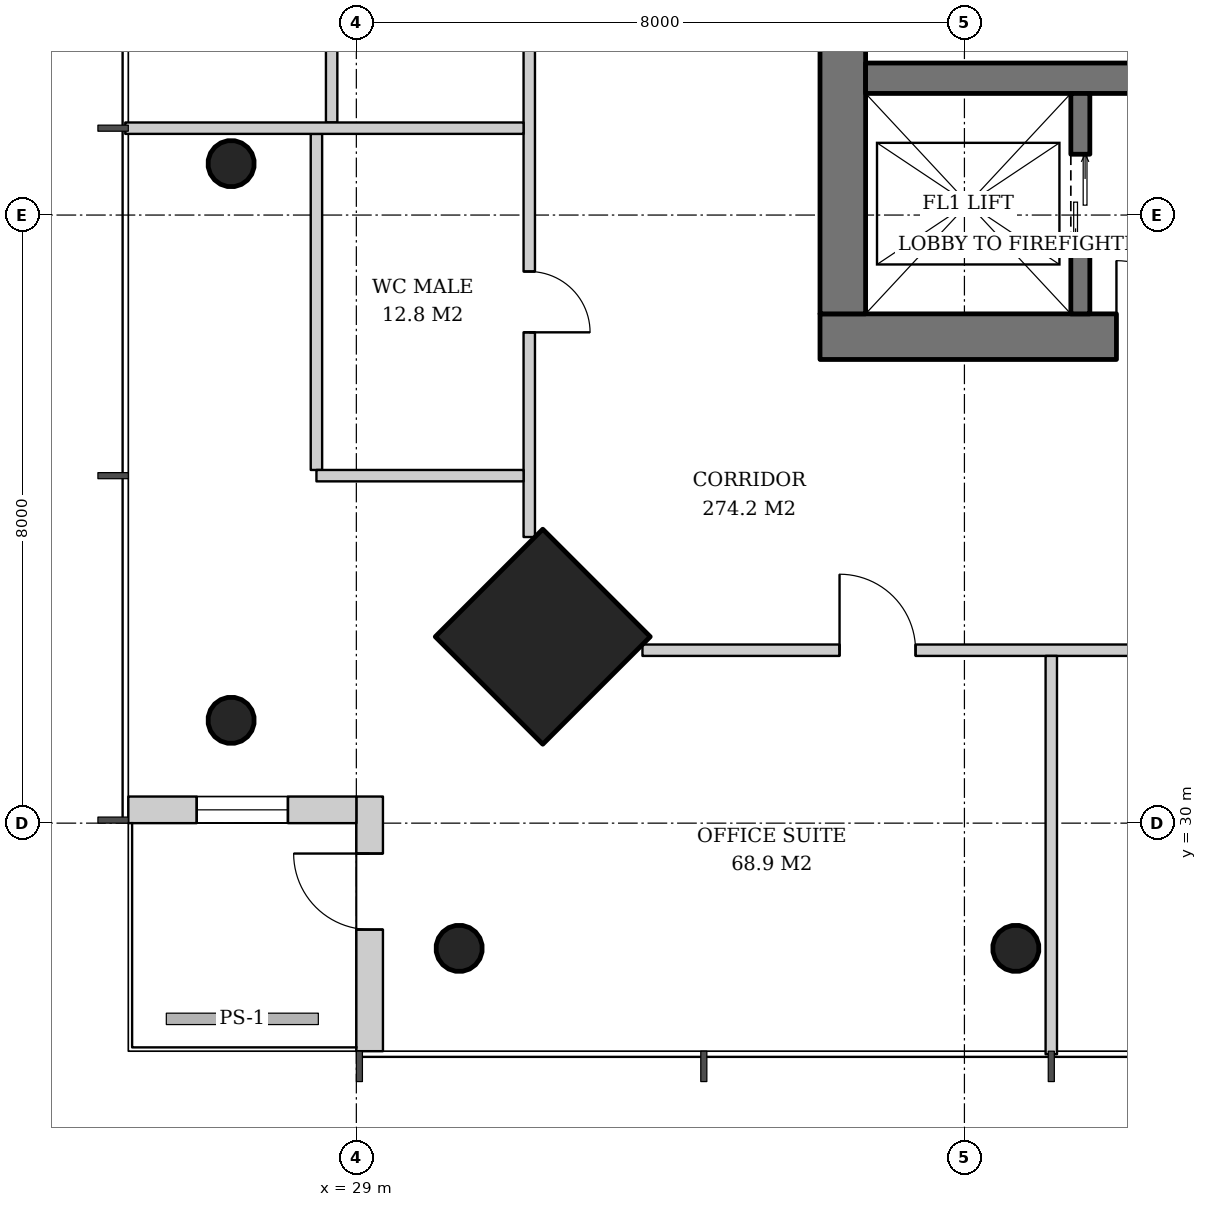
"""IFC4 building model, lengths in metres.
Left out: names, types, materials, properties, quantities, classifications, styles, units other than length and angle.
Written with IfcOpenShell. Run it as: python <this file> out.ifc"""

import sys

from ifc_helpers import new_model, si_unit, direction, frame, frame_2d, origin, origin_2d, place, context, subcontext, project, spatial, rectangle, hollow_circle, extrude, element, fill, save


model = new_model("IFC4")
c1 = context("Model", 3, precision=1e-05, world=origin(), true_north=direction((0.0, 1.0)))
c2 = subcontext(c1, "Body", "Model", "MODEL_VIEW")
j1 = project(units=[si_unit("LENGTHUNIT", "METRE"), si_unit("PLANEANGLEUNIT", "RADIAN")], contexts=[c1])
p1 = place(None, origin())
s1 = spatial("IfcSite", under=j1, at=p1, CompositionType="ELEMENT")
p2 = place(p1, origin())
s2 = spatial("IfcBuilding", under=s1, at=p2, CompositionType="ELEMENT")
p3 = place(p2, frame((0.0, 0.0, 218.6)))
s3 = spatial("IfcBuildingStorey", under=s2, at=p3, CompositionType="ELEMENT", Elevation=218.6)
p4 = place(p3, frame((31.414, 32.414, 0.0), z_axis=(0.031900153262, 0.031900153262, 0.998981861919), x_axis=(-0.707106781187, 0.707106781187, 0.0)))
e1 = element("IfcColumn", 1, at=p4, inside=s3, PredefinedType="COLUMN", context=c2, shape_type="SweptSolid", body=[
    extrude(rectangle(XDim=2.0, YDim=2.0, at=origin_2d()), origin(), (0.0, 0.0, 1.0), 3.804),
])
p5 = place(p3, frame((27.314, 31.314, 0.0), z_axis=(0.031964207655, 0.031964207655, 0.998977766949), x_axis=(-0.707106781187, 0.707106781187, 0.0)))
e2 = element("IfcColumn", 2, at=p5, inside=s3, PredefinedType="COLUMN", context=c2, shape_type="SweptSolid", body=[
    extrude(hollow_circle(Radius=0.305, WallThickness=0.025, at=origin_2d()), origin(), (0.0, 0.0, 1.0), 3.804),
])
p6 = place(p3, frame((27.314, 38.657, 0.0), z_axis=(0.031976494272, 0.015924037308, 0.99936176075), x_axis=(-0.445775033553, 0.895145027055, 0.0)))
e3 = element("IfcColumn", 3, at=p6, inside=s3, PredefinedType="COLUMN", context=c2, shape_type="SweptSolid", body=[
    extrude(hollow_circle(Radius=0.305, WallThickness=0.025, at=origin_2d()), origin(), (0.0, 0.0, 1.0), 3.802),
])
p7 = place(p3, frame((30.314, 28.314, 0.0), z_axis=(0.031964207655, 0.031964207655, 0.998977766949), x_axis=(-0.707106781187, 0.707106781187, 0.0)))
e4 = element("IfcColumn", 4, at=p7, inside=s3, PredefinedType="COLUMN", context=c2, shape_type="SweptSolid", body=[
    extrude(hollow_circle(Radius=0.305, WallThickness=0.025, at=origin_2d()), origin(), (0.0, 0.0, 1.0), 3.804),
])
p8 = place(p3, frame((37.657, 28.314, 0.0), z_axis=(0.015924037308, 0.031976494272, 0.99936176075), x_axis=(-0.895145027055, 0.445775033553, 0.0)))
e5 = element("IfcColumn", 5, at=p8, inside=s3, PredefinedType="COLUMN", context=c2, shape_type="SweptSolid", body=[
    extrude(hollow_circle(Radius=0.305, WallThickness=0.025, at=origin_2d()), origin(), (0.0, 0.0, 1.0), 3.802),
])
p9 = place(p3, frame((35.1, 36.4, 0.0), z_axis=(0.0, 0.0, 1.0), x_axis=(1.0, 0.0, 0.0)))
e6 = element("IfcWall", 6, at=p9, inside=s3, PredefinedType="SHEAR", context=c2, shape_type="SweptSolid", body=[
    extrude(rectangle(XDim=19.8, YDim=0.6, at=frame_2d((9.9, 0.0))), origin(), (0.0, 0.0, 1.0), 3.8),
])
p10 = place(p9, frame((3.9, 0.0, 0.0)))
e7 = element("IfcOpeningElement", 7, at=p10, cuts=e6, PredefinedType="OPENING", context=c2, shape_type="SweptSolid", body=[
    extrude(rectangle(XDim=1.0, YDim=2.1, at=frame_2d((0.5, 1.05))), frame((0.0, 0.31, 0.0), z_axis=(0.0, -1.0, 0.0), x_axis=(1.0, 0.0, 0.0)), (0.0, 0.0, 1.0), 0.62),
])
p11 = place(p9, frame((15.35, 0.0, 0.0)))
e8 = element("IfcOpeningElement", 8, at=p11, cuts=e6, PredefinedType="OPENING", context=c2, shape_type="SweptSolid", body=[
    extrude(rectangle(XDim=1.0, YDim=2.1, at=frame_2d((0.5, 1.05))), frame((0.0, 0.31, 0.0), z_axis=(0.0, -1.0, 0.0), x_axis=(1.0, 0.0, 0.0)), (0.0, 0.0, 1.0), 0.62),
])
p12 = place(p3, frame((35.4, 36.7, 0.0), z_axis=(0.0, 0.0, 1.0), x_axis=(0.0, 1.0, 0.0)))
e9 = element("IfcWall", 9, at=p12, inside=s3, PredefinedType="SHEAR", context=c2, shape_type="SweptSolid", body=[
    extrude(rectangle(XDim=18.6, YDim=0.6, at=frame_2d((9.3, 0.0))), origin(), (0.0, 0.0, 1.0), 3.8),
])
p13 = place(p12, frame((8.4, 0.0, 0.0)))
e10 = element("IfcOpeningElement", 10, at=p13, cuts=e9, PredefinedType="OPENING", context=c2, shape_type="SweptSolid", body=[
    extrude(rectangle(XDim=1.8, YDim=2.4, at=frame_2d((0.9, 1.2))), frame((0.0, 0.31, 0.0), z_axis=(0.0, -1.0, 0.0), x_axis=(1.0, 0.0, 0.0)), (0.0, 0.0, 1.0), 0.62),
])
p14 = place(p3, frame((35.7, 39.8, 0.0), z_axis=(0.0, 0.0, 1.0), x_axis=(1.0, 0.0, 0.0)))
e11 = element("IfcWall", 11, at=p14, inside=s3, PredefinedType="SHEAR", context=c2, shape_type="SweptSolid", body=[
    extrude(rectangle(XDim=18.6, YDim=0.4, at=frame_2d((9.3, 0.0))), origin(), (0.0, 0.0, 1.0), 3.8),
])
p15 = place(p3, frame((29.175, 27.0, 0.0), z_axis=(0.0, 0.0, 1.0), x_axis=(0.0, 1.0, 0.0)))
e12 = element("IfcWall", 12, at=p15, inside=s3, PredefinedType="SOLIDWALL", context=c2, shape_type="SweptSolid", body=[
    extrude(rectangle(XDim=3.35, YDim=0.35, at=frame_2d((1.675, 0.0))), origin(), (0.0, 0.0, 1.0), 3.62),
])
p16 = place(p15, frame((1.6, 0.0, 0.0)))
e13 = element("IfcOpeningElement", 13, at=p16, cuts=e12, PredefinedType="OPENING", context=c2, shape_type="SweptSolid", body=[
    extrude(rectangle(XDim=1.0, YDim=2.4, at=frame_2d((0.5, 1.2))), frame((0.0, 0.185, 0.0), z_axis=(0.0, -1.0, 0.0), x_axis=(1.0, 0.0, 0.0)), (0.0, 0.0, 1.0), 0.37),
])
p17 = place(p3, frame((29.0, 30.175, 0.0), z_axis=(0.0, 0.0, 1.0), x_axis=(-1.0, 0.0, 0.0)))
e14 = element("IfcWall", 14, at=p17, inside=s3, PredefinedType="SOLIDWALL", context=c2, shape_type="SweptSolid", body=[
    extrude(rectangle(XDim=3.0, YDim=0.35, at=frame_2d((1.5, 0.0))), origin(), (0.0, 0.0, 1.0), 3.62),
])
p18 = place(p17, frame((0.9, 0.0, 0.6)))
e15 = element("IfcOpeningElement", 15, at=p18, cuts=e14, PredefinedType="OPENING", context=c2, shape_type="SweptSolid", body=[
    extrude(rectangle(XDim=1.2, YDim=2.55, at=frame_2d((0.6, 1.275))), frame((0.0, 0.185, 0.0), z_axis=(0.0, -1.0, 0.0), x_axis=(1.0, 0.0, 0.0)), (0.0, 0.0, 1.0), 0.37),
])
p19 = place(p3, frame((38.525, 36.7, 0.0), z_axis=(0.0, 0.0, 1.0), x_axis=(0.0, 1.0, 0.0)))
e16 = element("IfcWall", 16, at=p19, inside=s3, PredefinedType="SHEAR", context=c2, shape_type="SweptSolid", body=[
    extrude(rectangle(XDim=2.9, YDim=0.25, at=frame_2d((1.45, 0.0))), origin(), (0.0, 0.0, 1.0), 3.8),
])
p20 = place(p19, frame((0.8, 0.0, 0.0)))
e17 = element("IfcOpeningElement", 17, at=p20, cuts=e16, PredefinedType="OPENING", context=c2, shape_type="SweptSolid", body=[
    extrude(rectangle(XDim=1.3, YDim=2.2, at=frame_2d((0.65, 1.1))), frame((0.0, 0.135, 0.0), z_axis=(0.0, -1.0, 0.0), x_axis=(1.0, 0.0, 0.0)), (0.0, 0.0, 1.0), 0.27),
])
p21 = place(p3, frame((28.675, 43.639, 0.0), z_axis=(0.0, 0.0, 1.0), x_axis=(0.0, -1.0, 0.0)))
e18 = element("IfcWall", 18, at=p21, inside=s3, PredefinedType="PARTITIONING", context=c2, shape_type="SweptSolid", body=[
    extrude(rectangle(XDim=4.422, YDim=0.15, at=frame_2d((2.211, 0.0))), origin(), (0.0, 0.0, 1.0), 2.867),
])
p22 = place(p3, frame((28.475, 39.068, 0.0), z_axis=(0.0, 0.0, 1.0), x_axis=(0.0, -1.0, 0.0)))
e19 = element("IfcWall", 19, at=p22, inside=s3, PredefinedType="PARTITIONING", context=c2, shape_type="SweptSolid", body=[
    extrude(rectangle(XDim=4.421, YDim=0.15, at=frame_2d((2.211, 0.0))), origin(), (0.0, 0.0, 1.0), 2.867),
])
p23 = place(p3, frame((31.275, 58.236, 0.0), z_axis=(0.0, 0.0, 1.0), x_axis=(0.0, -1.0, 0.0)))
e20 = element("IfcWall", 20, at=p23, inside=s3, PredefinedType="PARTITIONING", context=c2, shape_type="SweptSolid", body=[
    extrude(rectangle(XDim=24.472, YDim=0.15, at=frame_2d((12.236, 0.0))), origin(), (0.0, 0.0, 1.0), 2.867),
])
p24 = place(p23, frame((2.593, 0.0, 0.0)))
e21 = element("IfcOpeningElement", 21, at=p24, cuts=e20, PredefinedType="OPENING", context=c2, shape_type="SweptSolid", body=[
    extrude(rectangle(XDim=1.0, YDim=2.1, at=frame_2d((0.5, 1.05))), frame((0.0, 0.085, 0.0), z_axis=(0.0, -1.0, 0.0), x_axis=(1.0, 0.0, 0.0)), (0.0, 0.0, 1.0), 0.17),
])
p25 = place(p23, frame((7.164, 0.0, 0.0)))
e22 = element("IfcOpeningElement", 22, at=p25, cuts=e20, PredefinedType="OPENING", context=c2, shape_type="SweptSolid", body=[
    extrude(rectangle(XDim=1.0, YDim=2.1, at=frame_2d((0.5, 1.05))), frame((0.0, 0.085, 0.0), z_axis=(0.0, -1.0, 0.0), x_axis=(1.0, 0.0, 0.0)), (0.0, 0.0, 1.0), 0.17),
])
p26 = place(p23, frame((11.836, 0.0, 0.0)))
e23 = element("IfcOpeningElement", 23, at=p26, cuts=e20, PredefinedType="OPENING", context=c2, shape_type="SweptSolid", body=[
    extrude(rectangle(XDim=0.8, YDim=2.1, at=frame_2d((0.4, 1.05))), frame((0.0, 0.085, 0.0), z_axis=(0.0, -1.0, 0.0), x_axis=(1.0, 0.0, 0.0)), (0.0, 0.0, 1.0), 0.17),
])
p27 = place(p23, frame((16.307, 0.0, 0.0)))
e24 = element("IfcOpeningElement", 24, at=p27, cuts=e20, PredefinedType="OPENING", context=c2, shape_type="SweptSolid", body=[
    extrude(rectangle(XDim=1.0, YDim=2.1, at=frame_2d((0.5, 1.05))), frame((0.0, 0.085, 0.0), z_axis=(0.0, -1.0, 0.0), x_axis=(1.0, 0.0, 0.0)), (0.0, 0.0, 1.0), 0.17),
])
p28 = place(p23, frame((20.979, 0.0, 0.0)))
e25 = element("IfcOpeningElement", 25, at=p28, cuts=e20, PredefinedType="OPENING", context=c2, shape_type="SweptSolid", body=[
    extrude(rectangle(XDim=0.8, YDim=2.1, at=frame_2d((0.4, 1.05))), frame((0.0, 0.085, 0.0), z_axis=(0.0, -1.0, 0.0), x_axis=(1.0, 0.0, 0.0)), (0.0, 0.0, 1.0), 0.17),
])
p29 = place(p3, frame((31.2, 39.143, 0.0), z_axis=(0.0, 0.0, 1.0), x_axis=(-1.0, 0.0, 0.0)))
e26 = element("IfcWall", 26, at=p29, inside=s3, PredefinedType="PARTITIONING", context=c2, shape_type="SweptSolid", body=[
    extrude(rectangle(XDim=5.24, YDim=0.15, at=frame_2d((2.62, 0.0))), origin(), (0.0, 0.0, 1.0), 3.12),
])
p30 = place(p3, frame((31.2, 34.572, 0.0), z_axis=(0.0, 0.0, 1.0), x_axis=(-1.0, 0.0, 0.0)))
e27 = element("IfcWall", 27, at=p30, inside=s3, PredefinedType="PARTITIONING", context=c2, shape_type="SweptSolid", body=[
    extrude(rectangle(XDim=2.725, YDim=0.15, at=frame_2d((1.362, 0.0))), origin(), (0.0, 0.0, 1.0), 3.62),
])
p31 = place(p3, frame((32.764, 32.275, 0.0), z_axis=(0.0, 0.0, 1.0), x_axis=(1.0, 0.0, 0.0)))
e28 = element("IfcWall", 28, at=p31, inside=s3, PredefinedType="PARTITIONING", context=c2, shape_type="SweptSolid", body=[
    extrude(rectangle(XDim=24.472, YDim=0.15, at=frame_2d((12.236, 0.0))), origin(), (0.0, 0.0, 1.0), 2.867),
])
p32 = place(p31, frame((2.593, 0.0, 0.0)))
e29 = element("IfcOpeningElement", 29, at=p32, cuts=e28, PredefinedType="OPENING", context=c2, shape_type="SweptSolid", body=[
    extrude(rectangle(XDim=1.0, YDim=2.1, at=frame_2d((0.5, 1.05))), frame((0.0, 0.085, 0.0), z_axis=(0.0, -1.0, 0.0), x_axis=(1.0, 0.0, 0.0)), (0.0, 0.0, 1.0), 0.17),
])
p33 = place(p31, frame((7.164, 0.0, 0.0)))
e30 = element("IfcOpeningElement", 30, at=p33, cuts=e28, PredefinedType="OPENING", context=c2, shape_type="SweptSolid", body=[
    extrude(rectangle(XDim=1.0, YDim=2.1, at=frame_2d((0.5, 1.05))), frame((0.0, 0.085, 0.0), z_axis=(0.0, -1.0, 0.0), x_axis=(1.0, 0.0, 0.0)), (0.0, 0.0, 1.0), 0.17),
])
p34 = place(p31, frame((11.736, 0.0, 0.0)))
e31 = element("IfcOpeningElement", 31, at=p34, cuts=e28, PredefinedType="OPENING", context=c2, shape_type="SweptSolid", body=[
    extrude(rectangle(XDim=1.0, YDim=2.1, at=frame_2d((0.5, 1.05))), frame((0.0, 0.085, 0.0), z_axis=(0.0, -1.0, 0.0), x_axis=(1.0, 0.0, 0.0)), (0.0, 0.0, 1.0), 0.17),
])
p35 = place(p31, frame((16.307, 0.0, 0.0)))
e32 = element("IfcOpeningElement", 32, at=p35, cuts=e28, PredefinedType="OPENING", context=c2, shape_type="SweptSolid", body=[
    extrude(rectangle(XDim=1.0, YDim=2.1, at=frame_2d((0.5, 1.05))), frame((0.0, 0.085, 0.0), z_axis=(0.0, -1.0, 0.0), x_axis=(1.0, 0.0, 0.0)), (0.0, 0.0, 1.0), 0.17),
])
p36 = place(p31, frame((20.879, 0.0, 0.0)))
e33 = element("IfcOpeningElement", 33, at=p36, cuts=e28, PredefinedType="OPENING", context=c2, shape_type="SweptSolid", body=[
    extrude(rectangle(XDim=1.0, YDim=2.1, at=frame_2d((0.5, 1.05))), frame((0.0, 0.085, 0.0), z_axis=(0.0, -1.0, 0.0), x_axis=(1.0, 0.0, 0.0)), (0.0, 0.0, 1.0), 0.17),
])
p37 = place(p3, frame((38.143, 32.2, 0.0), z_axis=(0.0, 0.0, 1.0), x_axis=(0.0, -1.0, 0.0)))
e34 = element("IfcWall", 34, at=p37, inside=s3, PredefinedType="PARTITIONING", context=c2, shape_type="SweptSolid", body=[
    extrude(rectangle(XDim=5.24, YDim=0.15, at=frame_2d((2.62, 0.0))), origin(), (0.0, 0.0, 1.0), 3.12),
])
p38 = place(p16, origin())
e35 = element("IfcDoor", 35, at=p38, inside=s3, OperationType="SINGLE_SWING_RIGHT", PredefinedType="DOOR", context=c2, shape_type="SweptSolid", body=[
    extrude(rectangle(XDim=1.0, YDim=2.4, at=frame_2d((0.5, 1.2))), frame((0.0, 0.025, 0.0), z_axis=(0.0, -1.0, 0.0), x_axis=(1.0, 0.0, 0.0)), (0.0, 0.0, 1.0), 0.05),
])
fill(e13, e35)
p39 = place(p18, origin())
e36 = element("IfcWindow", 36, at=p39, inside=s3, PartitioningType="SINGLE_PANEL", PredefinedType="WINDOW", context=c2, shape_type="SweptSolid", body=[
    extrude(rectangle(XDim=1.2, YDim=2.55, at=frame_2d((0.6, 1.275))), frame((0.0, 0.03, 0.0), z_axis=(0.0, -1.0, 0.0), x_axis=(1.0, 0.0, 0.0)), (0.0, 0.0, 1.0), 0.06),
])
fill(e15, e36)
p40 = place(p20, origin())
e37 = element("IfcDoor", 37, at=p40, inside=s3, OperationType="DOUBLE_DOOR_SLIDING", PredefinedType="DOOR", context=c2, shape_type="SweptSolid", body=[
    extrude(rectangle(XDim=1.3, YDim=2.2, at=frame_2d((0.65, 1.1))), frame((0.0, 0.025, 0.0), z_axis=(0.0, -1.0, 0.0), x_axis=(1.0, 0.0, 0.0)), (0.0, 0.0, 1.0), 0.05),
])
fill(e17, e37)
p41 = place(p10, origin())
e38 = element("IfcDoor", 38, at=p41, inside=s3, OperationType="SINGLE_SWING_LEFT", PredefinedType="DOOR", context=c2, shape_type="SweptSolid", body=[
    extrude(rectangle(XDim=1.0, YDim=2.1, at=frame_2d((0.5, 1.05))), frame((0.0, 0.025, 0.0), z_axis=(0.0, -1.0, 0.0), x_axis=(1.0, 0.0, 0.0)), (0.0, 0.0, 1.0), 0.05),
])
fill(e7, e38)
p42 = place(p28, origin())
e39 = element("IfcDoor", 39, at=p42, inside=s3, OperationType="SINGLE_SWING_RIGHT", PredefinedType="DOOR", context=c2, shape_type="SweptSolid", body=[
    extrude(rectangle(XDim=0.8, YDim=2.1, at=frame_2d((0.4, 1.05))), frame((0.0, 0.025, 0.0), z_axis=(0.0, -1.0, 0.0), x_axis=(1.0, 0.0, 0.0)), (0.0, 0.0, 1.0), 0.05),
])
fill(e25, e39)
p43 = place(p32, origin())
e40 = element("IfcDoor", 40, at=p43, inside=s3, OperationType="SINGLE_SWING_LEFT", PredefinedType="DOOR", context=c2, shape_type="SweptSolid", body=[
    extrude(rectangle(XDim=1.0, YDim=2.1, at=frame_2d((0.5, 1.05))), frame((0.0, 0.025, 0.0), z_axis=(0.0, -1.0, 0.0), x_axis=(1.0, 0.0, 0.0)), (0.0, 0.0, 1.0), 0.05),
])
fill(e29, e40)
save(model, sys.argv[1])
